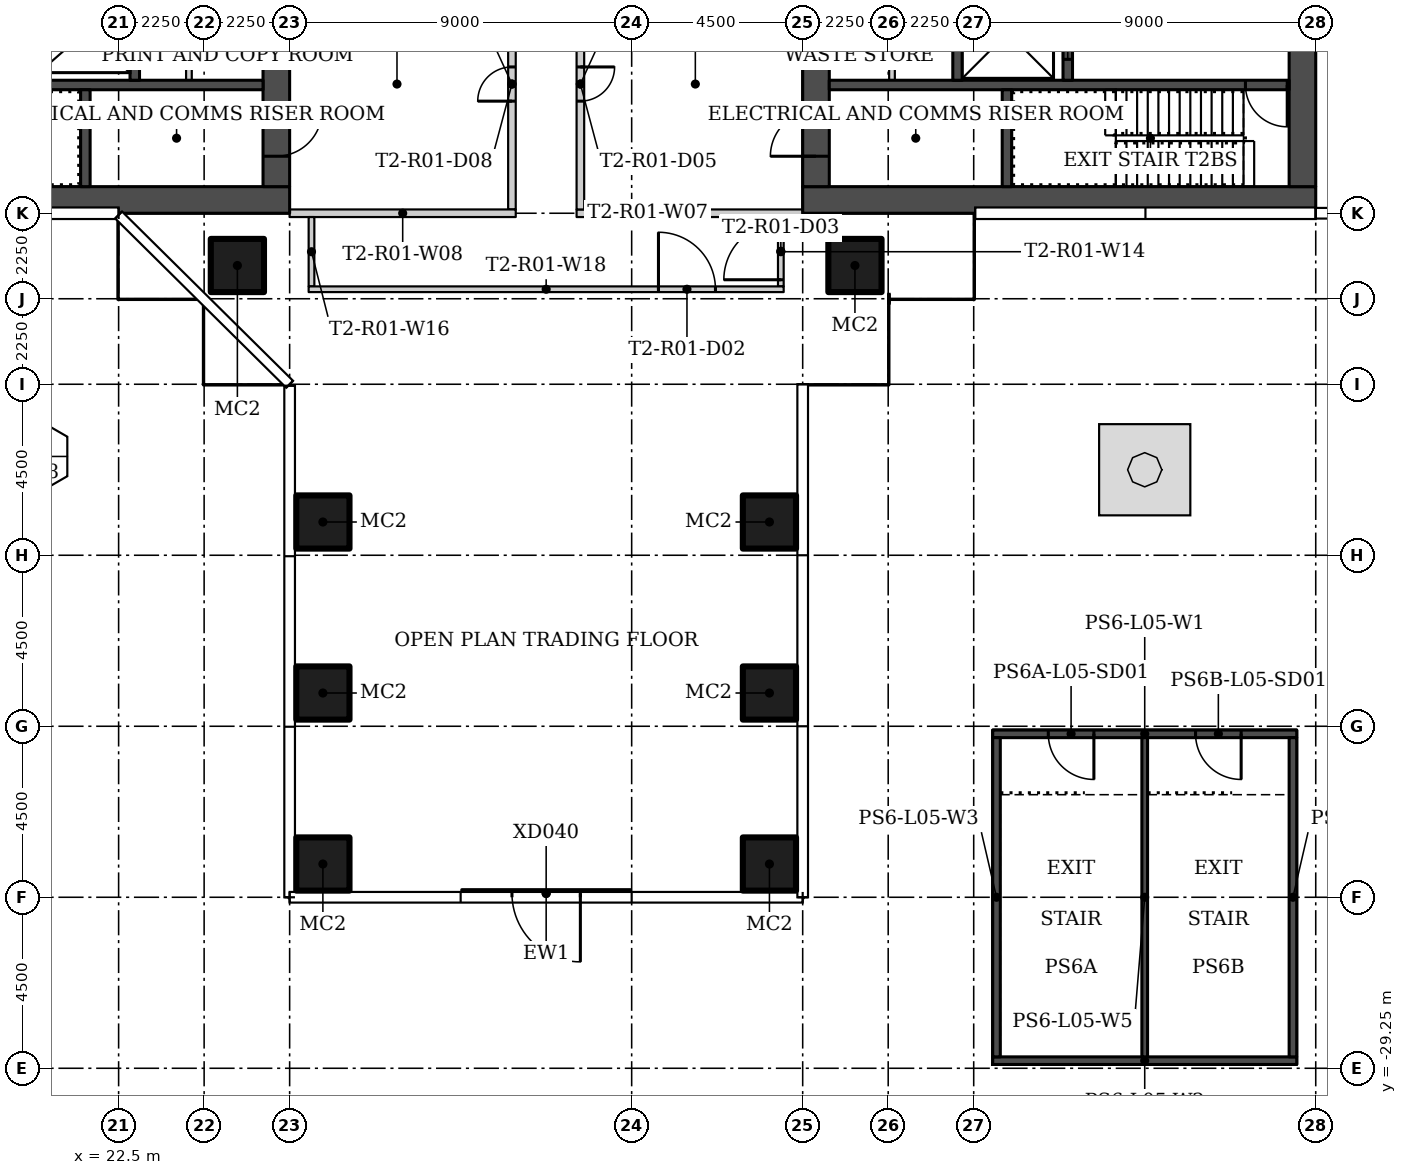
"""IFC4 building model, lengths in metres.
Left out: names, types, materials, properties, quantities, classifications, styles, units other than length and angle.
Written with IfcOpenShell. Run it as: python <this file> out.ifc"""

import sys

from ifc_helpers import new_model, si_unit, direction, frame, frame_2d, origin, origin_2d, place, context, subcontext, project, spatial, rectangle, hollow_rectangle, extrude, element, fill, save


model = new_model("IFC4")
c1 = context("Model", 3, precision=1e-05, world=origin(), true_north=direction((0.0, 1.0)))
c2 = subcontext(c1, "Body", "Model", "MODEL_VIEW")
j1 = project(units=[si_unit("LENGTHUNIT", "METRE"), si_unit("PLANEANGLEUNIT", "RADIAN")], contexts=[c1])
p1 = place(None, origin())
s1 = spatial("IfcSite", under=j1, at=p1, CompositionType="ELEMENT")
p2 = place(p1, origin())
s2 = spatial("IfcBuilding", under=s1, at=p2, CompositionType="ELEMENT")
p3 = place(p2, frame((0.0, 0.0, 28.5)))
s3 = spatial("IfcBuildingStorey", under=s2, at=p3, CompositionType="ELEMENT", Elevation=28.5)
for number, where in (
    (1, (25.625, -8.125, 0.0)),
    (2, (41.875, -8.125, 0.0)),
    (3, (39.625, -14.875, 0.0)),
    (4, (39.625, -19.375, 0.0)),
    (5, (39.625, -23.875, 0.0)),
    (6, (27.875, -14.875, 0.0)),
    (7, (27.875, -19.375, 0.0)),
    (8, (27.875, -23.875, 0.0)),
):
    element("IfcColumn", number, at=place(p3, frame(where)), inside=s3, PredefinedType="COLUMN", context=c2, shape_type="SweptSolid", body=[
        extrude(hollow_rectangle(XDim=1.4, YDim=1.4, WallThickness=0.05, at=origin_2d()), origin(), (0.0, 0.0, 1.0), 4.15),
    ])
p4 = place(p3, frame((32.85, -6.65, 0.0), z_axis=(0.0, 0.0, 1.0), x_axis=(0.0, 1.0, 0.0)))
e9 = element("IfcWall", 9, at=p4, inside=s3, PredefinedType="PARTITIONING", context=c2, shape_type="SweptSolid", body=[
    extrude(rectangle(XDim=6.6, YDim=0.2, at=frame_2d((3.3, 0.0))), origin(), (0.0, 0.0, 1.0), 4.15),
])
p5 = place(p4, frame((2.85, 0.0, 0.0)))
e10 = element("IfcOpeningElement", 10, at=p5, cuts=e9, PredefinedType="OPENING", context=c2, shape_type="SweptSolid", body=[
    extrude(rectangle(XDim=0.9, YDim=2.1, at=frame_2d((0.45, 1.05))), frame((0.0, 0.11, 0.0), z_axis=(0.0, -1.0, 0.0), x_axis=(1.0, 0.0, 0.0)), (0.0, 0.0, 1.0), 0.22),
])
for number, where in (
    (11, (34.55, -6.75, 0.0)),
    (12, (27.0, -6.75, 0.0)),
):
    element("IfcWall", number, at=place(p3, frame(where)), inside=s3, PredefinedType="PARTITIONING", context=c2, shape_type="SweptSolid", body=[
        extrude(rectangle(XDim=5.95, YDim=0.2, at=frame_2d((2.975, 0.0))), origin(), (0.0, 0.0, 1.0), 4.15),
    ])
p6 = place(p3, frame((34.65, -0.05, 0.0), z_axis=(0.0, 0.0, 1.0), x_axis=(0.0, -1.0, 0.0)))
e13 = element("IfcWall", 13, at=p6, inside=s3, PredefinedType="PARTITIONING", context=c2, shape_type="SweptSolid", body=[
    extrude(rectangle(XDim=6.6, YDim=0.2, at=frame_2d((3.3, 0.0))), origin(), (0.0, 0.0, 1.0), 4.15),
])
p7 = place(p6, frame((2.85, 0.0, 0.0)))
e14 = element("IfcOpeningElement", 14, at=p7, cuts=e13, PredefinedType="OPENING", context=c2, shape_type="SweptSolid", body=[
    extrude(rectangle(XDim=0.9, YDim=2.1, at=frame_2d((0.45, 1.05))), frame((0.0, 0.11, 0.0), z_axis=(0.0, -1.0, 0.0), x_axis=(1.0, 0.0, 0.0)), (0.0, 0.0, 1.0), 0.22),
])
p8 = place(p3, frame((39.925, -8.675, 0.0), z_axis=(0.0, 0.0, 1.0), x_axis=(0.0, 1.0, 0.0)))
e15 = element("IfcWall", 15, at=p8, inside=s3, PredefinedType="PARTITIONING", context=c2, shape_type="SweptSolid", body=[
    extrude(rectangle(XDim=1.825, YDim=0.15, at=frame_2d((0.913, 0.0))), origin(), (0.0, 0.0, 1.0), 4.15),
])
p9 = place(p8, frame((0.175, 0.0, 0.0)))
e16 = element("IfcOpeningElement", 16, at=p9, cuts=e15, PredefinedType="OPENING", context=c2, shape_type="SweptSolid", body=[
    extrude(rectangle(XDim=1.5, YDim=2.4, at=frame_2d((0.75, 1.2))), frame((0.0, 0.085, 0.0), z_axis=(0.0, -1.0, 0.0), x_axis=(1.0, 0.0, 0.0)), (0.0, 0.0, 1.0), 0.17),
])
p10 = place(p3, frame((27.575, -6.85, 0.0), z_axis=(0.0, 0.0, 1.0), x_axis=(0.0, -1.0, 0.0)))
e17 = element("IfcWall", 17, at=p10, inside=s3, PredefinedType="PARTITIONING", context=c2, shape_type="SweptSolid", body=[
    extrude(rectangle(XDim=1.825, YDim=0.15, at=frame_2d((0.913, 0.0))), origin(), (0.0, 0.0, 1.0), 4.15),
])
p11 = place(p3, frame((27.5, -8.75, 0.0)))
e18 = element("IfcWall", 18, at=p11, inside=s3, PredefinedType="PARTITIONING", context=c2, shape_type="SweptSolid", body=[
    extrude(rectangle(XDim=12.5, YDim=0.15, at=frame_2d((6.25, 0.0))), origin(), (0.0, 0.0, 1.0), 4.15),
])
p12 = place(p11, frame((9.205, 0.0, 0.0)))
e19 = element("IfcOpeningElement", 19, at=p12, cuts=e18, PredefinedType="OPENING", context=c2, shape_type="SweptSolid", body=[
    extrude(rectangle(XDim=1.5, YDim=2.4, at=frame_2d((0.75, 1.2))), frame((0.0, 0.085, 0.0), z_axis=(0.0, -1.0, 0.0), x_axis=(1.0, 0.0, 0.0)), (0.0, 0.0, 1.0), 0.17),
])
p13 = place(p3, frame((35.97, -24.65, 0.0), z_axis=(0.0, 0.0, 1.0), x_axis=(-1.0, 0.0, 0.0)))
e20 = element("IfcWall", 20, at=p13, inside=s3, PredefinedType="SOLIDWALL", context=c2, shape_type="SweptSolid", body=[
    extrude(rectangle(XDim=4.44, YDim=0.2, at=frame_2d((2.22, 0.0))), origin(), (0.0, 0.0, 1.0), 3.0),
])
p14 = place(p13, frame((1.32, 0.0, 0.0)))
e21 = element("IfcOpeningElement", 21, at=p14, cuts=e20, PredefinedType="OPENING", context=c2, shape_type="SweptSolid", body=[
    extrude(rectangle(XDim=1.8, YDim=2.4, at=frame_2d((0.9, 1.2))), frame((0.0, 0.11, 0.0), z_axis=(0.0, -1.0, 0.0), x_axis=(1.0, 0.0, 0.0)), (0.0, 0.0, 1.0), 0.22),
])
p15 = place(p3, frame((13.5, -6.4, 0.0)))
e22 = element("IfcWall", 22, at=p15, inside=s3, PredefinedType="SHEAR", context=c2, shape_type="SweptSolid", body=[
    extrude(rectangle(XDim=13.5, YDim=0.7, at=frame_2d((6.75, 0.0))), origin(), (0.0, 0.0, 1.0), 4.15),
])
p16 = place(p3, frame((26.65, 6.05, 0.0), z_axis=(0.0, 0.0, 1.0), x_axis=(0.0, -1.0, 0.0)))
e23 = element("IfcWall", 23, at=p16, inside=s3, PredefinedType="SHEAR", context=c2, shape_type="SweptSolid", body=[
    extrude(rectangle(XDim=12.1, YDim=0.7, at=frame_2d((6.05, 0.0))), origin(), (0.0, 0.0, 1.0), 4.15),
])
p17 = place(p16, frame((10.1, 0.0, 0.0)))
e24 = element("IfcOpeningElement", 24, at=p17, cuts=e23, PredefinedType="OPENING", context=c2, shape_type="SweptSolid", body=[
    extrude(rectangle(XDim=1.2, YDim=2.1, at=frame_2d((0.6, 1.05))), frame((0.0, 0.36, 0.0), z_axis=(0.0, -1.0, 0.0), x_axis=(1.0, 0.0, 0.0)), (0.0, 0.0, 1.0), 0.72),
])
p18 = place(p16, frame((3.9, 0.0, 0.0)))
e25 = element("IfcOpeningElement", 25, at=p18, cuts=e23, PredefinedType="OPENING", context=c2, shape_type="SweptSolid", body=[
    extrude(rectangle(XDim=1.8, YDim=2.4, at=frame_2d((0.9, 1.2))), frame((0.0, 0.36, 0.0), z_axis=(0.0, -1.0, 0.0), x_axis=(1.0, 0.0, 0.0)), (0.0, 0.0, 1.0), 0.72),
])
p19 = place(p3, frame((26.3, -3.375, 0.0), z_axis=(0.0, 0.0, 1.0), x_axis=(-1.0, 0.0, 0.0)))
e26 = element("IfcWall", 26, at=p19, inside=s3, PredefinedType="SHEAR", context=c2, shape_type="SweptSolid", body=[
    extrude(rectangle(XDim=12.1, YDim=0.25, at=frame_2d((6.05, 0.0))), origin(), (0.0, 0.0, 1.0), 4.15),
])
p20 = place(p19, frame((10.95, 0.0, 0.0)))
e27 = element("IfcOpeningElement", 27, at=p20, cuts=e26, PredefinedType="OPENING", context=c2, shape_type="SweptSolid", body=[
    extrude(rectangle(XDim=1.1, YDim=2.1, at=frame_2d((0.55, 1.05))), frame((0.0, 0.135, 0.0), z_axis=(0.0, -1.0, 0.0), x_axis=(1.0, 0.0, 0.0)), (0.0, 0.0, 1.0), 0.27),
])
p21 = place(p3, frame((21.625, -6.05, 0.0), z_axis=(0.0, 0.0, 1.0), x_axis=(0.0, 1.0, 0.0)))
e28 = element("IfcWall", 28, at=p21, inside=s3, PredefinedType="SHEAR", context=c2, shape_type="SweptSolid", body=[
    extrude(rectangle(XDim=2.55, YDim=0.25, at=frame_2d((1.275, 0.0))), origin(), (0.0, 0.0, 1.0), 4.15),
])
p22 = place(p3, frame((22.925, -3.25, 0.0), z_axis=(0.0, 0.0, 1.0), x_axis=(0.0, 1.0, 0.0)))
e29 = element("IfcWall", 29, at=p22, inside=s3, PredefinedType="SHEAR", context=c2, shape_type="SweptSolid", body=[
    extrude(rectangle(XDim=2.5, YDim=0.25, at=frame_2d((1.25, 0.0))), origin(), (0.0, 0.0, 1.0), 4.15),
])
p23 = place(p3, frame((24.35, -3.25, 0.0), z_axis=(0.0, 0.0, 1.0), x_axis=(0.0, 1.0, 0.0)))
e30 = element("IfcWall", 30, at=p23, inside=s3, PredefinedType="PARTITIONING", context=c2, shape_type="SweptSolid", body=[
    extrude(rectangle(XDim=2.5, YDim=0.15, at=frame_2d((1.25, 0.0))), origin(), (0.0, 0.0, 1.0), 4.15),
])
p24 = place(p3, frame((54.0, -6.4, 0.0), z_axis=(0.0, 0.0, 1.0), x_axis=(-1.0, 0.0, 0.0)))
e31 = element("IfcWall", 31, at=p24, inside=s3, PredefinedType="SHEAR", context=c2, shape_type="SweptSolid", body=[
    extrude(rectangle(XDim=13.5, YDim=0.7, at=frame_2d((6.75, 0.0))), origin(), (0.0, 0.0, 1.0), 4.15),
])
p25 = place(p3, frame((53.65, -6.05, 0.0), z_axis=(0.0, 0.0, 1.0), x_axis=(0.0, 1.0, 0.0)))
e32 = element("IfcWall", 32, at=p25, inside=s3, PredefinedType="SHEAR", context=c2, shape_type="SweptSolid", body=[
    extrude(rectangle(XDim=12.1, YDim=0.7, at=frame_2d((6.05, 0.0))), origin(), (0.0, 0.0, 1.0), 4.15),
])
p26 = place(p25, frame((6.4, 0.0, 0.0)))
e33 = element("IfcOpeningElement", 33, at=p26, cuts=e32, PredefinedType="OPENING", context=c2, shape_type="SweptSolid", body=[
    extrude(rectangle(XDim=1.8, YDim=2.4, at=frame_2d((0.9, 1.2))), frame((0.0, 0.36, 0.0), z_axis=(0.0, -1.0, 0.0), x_axis=(1.0, 0.0, 0.0)), (0.0, 0.0, 1.0), 0.72),
])
p27 = place(p3, frame((40.85, -6.05, 0.0), z_axis=(0.0, 0.0, 1.0), x_axis=(0.0, 1.0, 0.0)))
e34 = element("IfcWall", 34, at=p27, inside=s3, PredefinedType="SHEAR", context=c2, shape_type="SweptSolid", body=[
    extrude(rectangle(XDim=12.1, YDim=0.7, at=frame_2d((6.05, 0.0))), origin(), (0.0, 0.0, 1.0), 4.15),
])
p28 = place(p27, frame((0.8, 0.0, 0.0)))
e35 = element("IfcOpeningElement", 35, at=p28, cuts=e34, PredefinedType="OPENING", context=c2, shape_type="SweptSolid", body=[
    extrude(rectangle(XDim=1.2, YDim=2.1, at=frame_2d((0.6, 1.05))), frame((0.0, 0.36, 0.0), z_axis=(0.0, -1.0, 0.0), x_axis=(1.0, 0.0, 0.0)), (0.0, 0.0, 1.0), 0.72),
])
p29 = place(p27, frame((6.4, 0.0, 0.0)))
e36 = element("IfcOpeningElement", 36, at=p29, cuts=e34, PredefinedType="OPENING", context=c2, shape_type="SweptSolid", body=[
    extrude(rectangle(XDim=1.8, YDim=2.4, at=frame_2d((0.9, 1.2))), frame((0.0, 0.36, 0.0), z_axis=(0.0, -1.0, 0.0), x_axis=(1.0, 0.0, 0.0)), (0.0, 0.0, 1.0), 0.72),
])
p30 = place(p3, frame((53.3, -3.375, 0.0), z_axis=(0.0, 0.0, 1.0), x_axis=(-1.0, 0.0, 0.0)))
e37 = element("IfcWall", 37, at=p30, inside=s3, PredefinedType="SHEAR", context=c2, shape_type="SweptSolid", body=[
    extrude(rectangle(XDim=12.1, YDim=0.25, at=frame_2d((6.05, 0.0))), origin(), (0.0, 0.0, 1.0), 4.15),
])
p31 = place(p30, frame((0.05, 0.0, 0.0)))
e38 = element("IfcOpeningElement", 38, at=p31, cuts=e37, PredefinedType="OPENING", context=c2, shape_type="SweptSolid", body=[
    extrude(rectangle(XDim=1.1, YDim=2.1, at=frame_2d((0.55, 1.05))), frame((0.0, 0.135, 0.0), z_axis=(0.0, -1.0, 0.0), x_axis=(1.0, 0.0, 0.0)), (0.0, 0.0, 1.0), 0.27),
])
p32 = place(p3, frame((45.875, -6.05, 0.0), z_axis=(0.0, 0.0, 1.0), x_axis=(0.0, 1.0, 0.0)))
e39 = element("IfcWall", 39, at=p32, inside=s3, PredefinedType="SHEAR", context=c2, shape_type="SweptSolid", body=[
    extrude(rectangle(XDim=2.55, YDim=0.25, at=frame_2d((1.275, 0.0))), origin(), (0.0, 0.0, 1.0), 4.15),
])
p33 = place(p3, frame((47.475, -3.25, 0.0), z_axis=(0.0, 0.0, 1.0), x_axis=(0.0, 1.0, 0.0)))
e40 = element("IfcWall", 40, at=p33, inside=s3, PredefinedType="SHEAR", context=c2, shape_type="SweptSolid", body=[
    extrude(rectangle(XDim=2.5, YDim=0.25, at=frame_2d((1.25, 0.0))), origin(), (0.0, 0.0, 1.0), 4.15),
])
p34 = place(p33, frame((0.55, 0.0, 0.0)))
e41 = element("IfcOpeningElement", 41, at=p34, cuts=e40, PredefinedType="OPENING", context=c2, shape_type="SweptSolid", body=[
    extrude(rectangle(XDim=1.4, YDim=2.4, at=frame_2d((0.7, 1.2))), frame((0.0, 0.135, 0.0), z_axis=(0.0, -1.0, 0.0), x_axis=(1.0, 0.0, 0.0)), (0.0, 0.0, 1.0), 0.27),
])
p35 = place(p3, frame((44.575, -3.25, 0.0), z_axis=(0.0, 0.0, 1.0), x_axis=(0.0, 1.0, 0.0)))
e42 = element("IfcWall", 42, at=p35, inside=s3, PredefinedType="SHEAR", context=c2, shape_type="SweptSolid", body=[
    extrude(rectangle(XDim=2.5, YDim=0.25, at=frame_2d((1.25, 0.0))), origin(), (0.0, 0.0, 1.0), 4.15),
])
p36 = place(p3, frame((42.85, -3.25, 0.0), z_axis=(0.0, 0.0, 1.0), x_axis=(0.0, 1.0, 0.0)))
e43 = element("IfcWall", 43, at=p36, inside=s3, PredefinedType="PARTITIONING", context=c2, shape_type="SweptSolid", body=[
    extrude(rectangle(XDim=2.5, YDim=0.15, at=frame_2d((1.25, 0.0))), origin(), (0.0, 0.0, 1.0), 4.15),
])
p37 = place(p3, frame((53.5, -20.45, 0.0), z_axis=(0.0, 0.0, 1.0), x_axis=(-1.0, 0.0, 0.0)))
e44 = element("IfcWall", 44, at=p37, inside=s3, PredefinedType="SHEAR", context=c2, shape_type="SweptSolid", body=[
    extrude(rectangle(XDim=8.0, YDim=0.2, at=frame_2d((4.0, 0.0))), origin(), (0.0, 0.0, 1.0), 2.8),
])
p38 = place(p37, frame((5.337, 0.0, 0.0)))
e45 = element("IfcOpeningElement", 45, at=p38, cuts=e44, PredefinedType="OPENING", context=c2, shape_type="SweptSolid", body=[
    extrude(rectangle(XDim=1.2, YDim=2.4, at=frame_2d((0.6, 1.2))), frame((0.0, 0.11, 0.0), z_axis=(0.0, -1.0, 0.0), x_axis=(1.0, 0.0, 0.0)), (0.0, 0.0, 1.0), 0.22),
])
p39 = place(p37, frame((1.462, 0.0, 0.0)))
e46 = element("IfcOpeningElement", 46, at=p39, cuts=e44, PredefinedType="OPENING", context=c2, shape_type="SweptSolid", body=[
    extrude(rectangle(XDim=1.2, YDim=2.4, at=frame_2d((0.6, 1.2))), frame((0.0, 0.11, 0.0), z_axis=(0.0, -1.0, 0.0), x_axis=(1.0, 0.0, 0.0)), (0.0, 0.0, 1.0), 0.22),
])
p40 = place(p3, frame((45.5, -29.05, 0.0)))
e47 = element("IfcWall", 47, at=p40, inside=s3, PredefinedType="SHEAR", context=c2, shape_type="SweptSolid", body=[
    extrude(rectangle(XDim=8.0, YDim=0.2, at=frame_2d((4.0, 0.0))), origin(), (0.0, 0.0, 1.0), 2.8),
])
for number, where, z_axis, x_axis in (
    (48, (45.6, -28.95, 0.0), (0.0, 0.0, 1.0), (0.0, 1.0, 0.0)),
    (49, (53.4, -28.95, 0.0), (0.0, 0.0, 1.0), (0.0, 1.0, 0.0)),
):
    element("IfcWall", number, at=place(p3, frame(where, z_axis=z_axis, x_axis=x_axis)), inside=s3, PredefinedType="SHEAR", context=c2, shape_type="SweptSolid", body=[
        extrude(rectangle(XDim=8.4, YDim=0.2, at=frame_2d((4.2, 0.0))), origin(), (0.0, 0.0, 1.0), 2.8),
    ])
p41 = place(p3, frame((49.5, -28.95, 0.0), z_axis=(0.0, 0.0, 1.0), x_axis=(0.0, 1.0, 0.0)))
e50 = element("IfcWall", 50, at=p41, inside=s3, PredefinedType="SHEAR", context=c2, shape_type="SweptSolid", body=[
    extrude(rectangle(XDim=8.4, YDim=0.15, at=frame_2d((4.2, 0.0))), origin(), (0.0, 0.0, 1.0), 2.8),
])
p42 = place(p12, origin())
e51 = element("IfcDoor", 51, at=p42, inside=s3, OperationType="DOUBLE_DOOR_SINGLE_SWING", PredefinedType="DOOR", context=c2, shape_type="SweptSolid", body=[
    extrude(rectangle(XDim=1.5, YDim=2.4, at=frame_2d((0.75, 1.2))), frame((0.0, 0.025, 0.0), z_axis=(0.0, -1.0, 0.0), x_axis=(1.0, 0.0, 0.0)), (0.0, 0.0, 1.0), 0.05),
])
fill(e19, e51)
p43 = place(p9, origin())
e52 = element("IfcDoor", 52, at=p43, inside=s3, OperationType="DOUBLE_DOOR_SINGLE_SWING", PredefinedType="DOOR", context=c2, shape_type="SweptSolid", body=[
    extrude(rectangle(XDim=1.5, YDim=2.4, at=frame_2d((0.75, 1.2))), frame((0.0, 0.025, 0.0), z_axis=(0.0, -1.0, 0.0), x_axis=(1.0, 0.0, 0.0)), (0.0, 0.0, 1.0), 0.05),
])
fill(e16, e52)
p44 = place(p7, origin())
e53 = element("IfcDoor", 53, at=p44, inside=s3, OperationType="SINGLE_SWING_RIGHT", PredefinedType="DOOR", context=c2, shape_type="SweptSolid", body=[
    extrude(rectangle(XDim=0.9, YDim=2.1, at=frame_2d((0.45, 1.05))), frame((0.0, 0.025, 0.0), z_axis=(0.0, -1.0, 0.0), x_axis=(1.0, 0.0, 0.0)), (0.0, 0.0, 1.0), 0.05),
])
fill(e14, e53)
p45 = place(p5, origin())
e54 = element("IfcDoor", 54, at=p45, inside=s3, OperationType="SINGLE_SWING_RIGHT", PredefinedType="DOOR", context=c2, shape_type="SweptSolid", body=[
    extrude(rectangle(XDim=0.9, YDim=2.1, at=frame_2d((0.45, 1.05))), frame((0.0, 0.025, 0.0), z_axis=(0.0, -1.0, 0.0), x_axis=(1.0, 0.0, 0.0)), (0.0, 0.0, 1.0), 0.05),
])
fill(e10, e54)
p46 = place(p14, origin())
e55 = element("IfcDoor", 55, at=p46, inside=s3, OperationType="DOUBLE_DOOR_SINGLE_SWING", PredefinedType="DOOR", context=c2, shape_type="SweptSolid", body=[
    extrude(rectangle(XDim=1.8, YDim=2.4, at=frame_2d((0.9, 1.2))), frame((0.0, 0.025, 0.0), z_axis=(0.0, -1.0, 0.0), x_axis=(1.0, 0.0, 0.0)), (0.0, 0.0, 1.0), 0.05),
])
fill(e21, e55)
p47 = place(p17, origin())
e56 = element("IfcDoor", 56, at=p47, inside=s3, OperationType="SINGLE_SWING_RIGHT", PredefinedType="DOOR", context=c2, shape_type="SweptSolid", body=[
    extrude(rectangle(XDim=1.2, YDim=2.1, at=frame_2d((0.6, 1.05))), frame((0.0, 0.025, 0.0), z_axis=(0.0, -1.0, 0.0), x_axis=(1.0, 0.0, 0.0)), (0.0, 0.0, 1.0), 0.05),
])
fill(e24, e56)
p48 = place(p28, origin())
e57 = element("IfcDoor", 57, at=p48, inside=s3, OperationType="SINGLE_SWING_LEFT", PredefinedType="DOOR", context=c2, shape_type="SweptSolid", body=[
    extrude(rectangle(XDim=1.2, YDim=2.1, at=frame_2d((0.6, 1.05))), frame((0.0, 0.025, 0.0), z_axis=(0.0, -1.0, 0.0), x_axis=(1.0, 0.0, 0.0)), (0.0, 0.0, 1.0), 0.05),
])
fill(e35, e57)
p49 = place(p31, origin())
e58 = element("IfcDoor", 58, at=p49, inside=s3, OperationType="SINGLE_SWING_LEFT", PredefinedType="DOOR", context=c2, shape_type="SweptSolid", body=[
    extrude(rectangle(XDim=1.1, YDim=2.1, at=frame_2d((0.55, 1.05))), frame((0.0, 0.025, 0.0), z_axis=(0.0, -1.0, 0.0), x_axis=(1.0, 0.0, 0.0)), (0.0, 0.0, 1.0), 0.05),
])
fill(e38, e58)
p50 = place(p34, origin())
e59 = element("IfcDoor", 59, at=p50, inside=s3, OperationType="SLIDING_TO_LEFT", PredefinedType="DOOR", context=c2, shape_type="SweptSolid", body=[
    extrude(rectangle(XDim=1.4, YDim=2.4, at=frame_2d((0.7, 1.2))), frame((0.0, 0.025, 0.0), z_axis=(0.0, -1.0, 0.0), x_axis=(1.0, 0.0, 0.0)), (0.0, 0.0, 1.0), 0.05),
])
fill(e41, e59)
p51 = place(p38, origin())
e60 = element("IfcDoor", 60, at=p51, inside=s3, OperationType="SINGLE_SWING_LEFT", PredefinedType="DOOR", context=c2, shape_type="SweptSolid", body=[
    extrude(rectangle(XDim=1.2, YDim=2.4, at=frame_2d((0.6, 1.2))), frame((0.0, 0.025, 0.0), z_axis=(0.0, -1.0, 0.0), x_axis=(1.0, 0.0, 0.0)), (0.0, 0.0, 1.0), 0.05),
])
fill(e45, e60)
p52 = place(p39, origin())
e61 = element("IfcDoor", 61, at=p52, inside=s3, OperationType="SINGLE_SWING_RIGHT", PredefinedType="DOOR", context=c2, shape_type="SweptSolid", body=[
    extrude(rectangle(XDim=1.2, YDim=2.4, at=frame_2d((0.6, 1.2))), frame((0.0, 0.025, 0.0), z_axis=(0.0, -1.0, 0.0), x_axis=(1.0, 0.0, 0.0)), (0.0, 0.0, 1.0), 0.05),
])
fill(e46, e61)
save(model, sys.argv[1])
